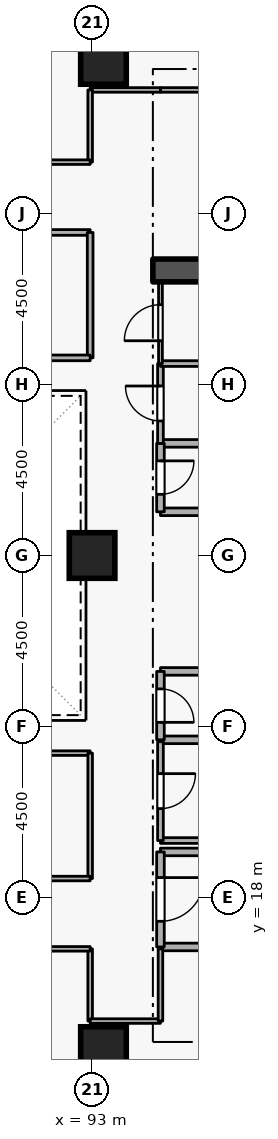
"""IFC4 building model, lengths in metres.
Left out: names, types, materials, properties, quantities, classifications, styles, units other than length and angle.
Written with IfcOpenShell. Run it as: python <this file> out.ifc"""

import sys

from ifc_helpers import new_model, si_unit, direction, frame, frame_2d, origin, origin_2d, place, context, subcontext, project, spatial, rectangle, extrude, element, fill, save


model = new_model("IFC4")
c1 = context("Model", 3, precision=1e-05, world=origin(), true_north=direction((0.0, 1.0)))
c2 = subcontext(c1, "Body", "Model", "MODEL_VIEW")
j1 = project(units=[si_unit("LENGTHUNIT", "METRE"), si_unit("PLANEANGLEUNIT", "RADIAN")], contexts=[c1])
p1 = place(None, origin())
s1 = spatial("IfcSite", under=j1, at=p1, CompositionType="ELEMENT")
p2 = place(p1, origin())
s2 = spatial("IfcBuilding", under=s1, at=p2, CompositionType="ELEMENT")
p3 = place(p2, frame((0.0, 0.0, 94.5)))
s3 = spatial("IfcBuildingStorey", under=s2, at=p3, CompositionType="ELEMENT", Elevation=94.5)
p4 = place(p3, frame((94.6, 34.5, 0.0), z_axis=(0.0, 0.0, 1.0), x_axis=(1.0, 0.0, 0.0)))
e1 = element("IfcWall", 1, at=p4, inside=s3, PredefinedType="SHEAR", context=c2, shape_type="SweptSolid", body=[
    extrude(rectangle(XDim=5.7, YDim=0.6, at=frame_2d((2.85, 0.0))), origin(), (0.0, 0.0, 1.0), 3.6),
])
for number, where, z_axis, x_axis in (
    (2, (93.3, 14.0, 0.0), (0.0, 0.0, 1.0), (1.0, 0.0, 0.0)),
    (3, (93.3, 40.0, 0.0), (0.0, 0.0, 1.0), (1.0, 0.0, 0.0)),
    (4, (93.0, 27.0, 0.0), (0.0, 0.0, 1.0), (1.0, 0.0, 0.0)),
):
    element("IfcColumn", number, at=place(p3, frame(where, z_axis=z_axis, x_axis=x_axis)), inside=s3, PredefinedType="COLUMN", context=c2, shape_type="SweptSolid", body=[
        extrude(rectangle(XDim=1.2, YDim=1.2, at=origin_2d()), origin(), (0.0, 0.0, 1.0), 3.6),
    ])
p5 = place(p3, frame((94.8, 16.7, 0.0), z_axis=(0.0, 0.0, 1.0), x_axis=(1.0, 0.0, 0.0)))
e5 = element("IfcWall", 5, at=p5, inside=s3, PredefinedType="STANDARD", context=c2, shape_type="SweptSolid", body=[
    extrude(rectangle(XDim=5.7, YDim=0.2, at=frame_2d((2.85, 0.0))), origin(), (0.0, 0.0, 1.0), 3.3),
])
p6 = place(p3, frame((97.1, 19.2, 0.0), z_axis=(0.0, 0.0, 1.0), x_axis=(-1.0, 0.0, 0.0)))
e6 = element("IfcWall", 6, at=p6, inside=s3, PredefinedType="STANDARD", context=c2, shape_type="SweptSolid", body=[
    extrude(rectangle(XDim=2.3, YDim=0.2, at=frame_2d((1.15, 0.0))), origin(), (0.0, 0.0, 1.0), 2.505),
])
p7 = place(p3, frame((94.8, 19.2, 0.0), z_axis=(0.0, 0.0, 1.0), x_axis=(0.0, -1.0, 0.0)))
e7 = element("IfcWall", 7, at=p7, inside=s3, PredefinedType="STANDARD", context=c2, shape_type="SweptSolid", body=[
    extrude(rectangle(XDim=2.5, YDim=0.2, at=frame_2d((1.25, 0.0))), origin(), (0.0, 0.0, 1.0), 3.3),
])
p8 = place(p7, frame((0.675, 0.0, 0.0)))
e8 = element("IfcOpeningElement", 8, at=p8, cuts=e7, PredefinedType="OPENING", context=c2, shape_type="SweptSolid", body=[
    extrude(rectangle(XDim=1.15, YDim=2.1, at=frame_2d((0.575, 1.05))), frame((0.0, 0.11, 0.0), z_axis=(0.0, -1.0, 0.0), x_axis=(1.0, 0.0, 0.0)), (0.0, 0.0, 1.0), 0.22),
])
for number, where, z_axis, x_axis in (
    (9, (94.8, 28.15, 0.0), (0.0, 0.0, 1.0), (1.0, 0.0, 0.0)),
    (10, (96.85, 29.95, 0.0), (0.0, 0.0, 1.0), (-1.0, 0.0, 0.0)),
):
    element("IfcWall", number, at=place(p3, frame(where, z_axis=z_axis, x_axis=x_axis)), inside=s3, PredefinedType="STANDARD", context=c2, shape_type="SweptSolid", body=[
        extrude(rectangle(XDim=2.05, YDim=0.2, at=frame_2d((1.025, 0.0))), origin(), (0.0, 0.0, 1.0), 3.3),
    ])
p9 = place(p3, frame((94.8, 29.95, 0.0), z_axis=(0.0, 0.0, 1.0), x_axis=(0.0, -1.0, 0.0)))
e11 = element("IfcWall", 11, at=p9, inside=s3, PredefinedType="STANDARD", context=c2, shape_type="SweptSolid", body=[
    extrude(rectangle(XDim=1.8, YDim=0.2, at=frame_2d((0.9, 0.0))), origin(), (0.0, 0.0, 1.0), 3.3),
])
p10 = place(p9, frame((0.46, 0.0, 0.0)))
e12 = element("IfcOpeningElement", 12, at=p10, cuts=e11, PredefinedType="OPENING", context=c2, shape_type="SweptSolid", body=[
    extrude(rectangle(XDim=0.88, YDim=2.04, at=frame_2d((0.44, 1.02))), frame((0.0, 0.11, 0.0), z_axis=(0.0, -1.0, 0.0), x_axis=(1.0, 0.0, 0.0)), (0.0, 0.0, 1.0), 0.22),
])
for number, where, z_axis, x_axis in (
    (13, (94.8, 22.15, 0.0), (0.0, 0.0, 1.0), (1.0, 0.0, 0.0)),
    (14, (96.85, 23.95, 0.0), (0.0, 0.0, 1.0), (-1.0, 0.0, 0.0)),
):
    element("IfcWall", number, at=place(p3, frame(where, z_axis=z_axis, x_axis=x_axis)), inside=s3, PredefinedType="STANDARD", context=c2, shape_type="SweptSolid", body=[
        extrude(rectangle(XDim=2.05, YDim=0.2, at=frame_2d((1.025, 0.0))), origin(), (0.0, 0.0, 1.0), 3.3),
    ])
p11 = place(p3, frame((94.8, 23.95, 0.0), z_axis=(0.0, 0.0, 1.0), x_axis=(0.0, -1.0, 0.0)))
e15 = element("IfcWall", 15, at=p11, inside=s3, PredefinedType="STANDARD", context=c2, shape_type="SweptSolid", body=[
    extrude(rectangle(XDim=1.8, YDim=0.2, at=frame_2d((0.9, 0.0))), origin(), (0.0, 0.0, 1.0), 3.3),
])
p12 = place(p11, frame((0.46, 0.0, 0.0)))
e16 = element("IfcOpeningElement", 16, at=p12, cuts=e15, PredefinedType="OPENING", context=c2, shape_type="SweptSolid", body=[
    extrude(rectangle(XDim=0.88, YDim=2.04, at=frame_2d((0.44, 1.02))), frame((0.0, 0.11, 0.0), z_axis=(0.0, -1.0, 0.0), x_axis=(1.0, 0.0, 0.0)), (0.0, 0.0, 1.0), 0.22),
])
p13 = place(p3, frame((94.8, 19.5, 0.0), z_axis=(0.0, 0.0, 1.0), x_axis=(1.0, 0.0, 0.0)))
e17 = element("IfcWall", 17, at=p13, inside=s3, PredefinedType="PARTITIONING", context=c2, shape_type="SweptSolid", body=[
    extrude(rectangle(XDim=2.05, YDim=0.15, at=frame_2d((1.025, 0.0))), origin(), (0.0, 0.0, 1.0), 2.505),
])
p14 = place(p3, frame((94.8, 22.1, 0.0), z_axis=(0.0, 0.0, 1.0), x_axis=(0.0, -1.0, 0.0)))
e18 = element("IfcWall", 18, at=p14, inside=s3, PredefinedType="PARTITIONING", context=c2, shape_type="SweptSolid", body=[
    extrude(rectangle(XDim=2.6, YDim=0.15, at=frame_2d((1.3, 0.0))), origin(), (0.0, 0.0, 1.0), 3.3),
])
p15 = place(p14, frame((0.84, 0.0, 0.0)))
e19 = element("IfcOpeningElement", 19, at=p15, cuts=e18, PredefinedType="OPENING", context=c2, shape_type="SweptSolid", body=[
    extrude(rectangle(XDim=0.92, YDim=2.08, at=frame_2d((0.46, 1.04))), frame((0.0, 0.085, 0.0), z_axis=(0.0, -1.0, 0.0), x_axis=(1.0, 0.0, 0.0)), (0.0, 0.0, 1.0), 0.17),
])
p16 = place(p3, frame((94.8, 29.95, 0.0), z_axis=(0.0, 0.0, 1.0), x_axis=(0.0, 1.0, 0.0)))
e20 = element("IfcWall", 20, at=p16, inside=s3, PredefinedType="PARTITIONING", context=c2, shape_type="SweptSolid", body=[
    extrude(rectangle(XDim=2.1, YDim=0.15, at=frame_2d((1.05, 0.0))), origin(), (0.0, 0.0, 1.0), 3.3),
])
p17 = place(p16, frame((0.59, 0.0, 0.0)))
e21 = element("IfcOpeningElement", 21, at=p17, cuts=e20, PredefinedType="OPENING", context=c2, shape_type="SweptSolid", body=[
    extrude(rectangle(XDim=0.92, YDim=2.08, at=frame_2d((0.46, 1.04))), frame((0.0, 0.085, 0.0), z_axis=(0.0, -1.0, 0.0), x_axis=(1.0, 0.0, 0.0)), (0.0, 0.0, 1.0), 0.17),
])
p18 = place(p3, frame((94.8, 32.05, 0.0), z_axis=(0.0, 0.0, 1.0), x_axis=(1.0, 0.0, 0.0)))
e22 = element("IfcWall", 22, at=p18, inside=s3, PredefinedType="PARTITIONING", context=c2, shape_type="SweptSolid", body=[
    extrude(rectangle(XDim=2.05, YDim=0.15, at=frame_2d((1.025, 0.0))), origin(), (0.0, 0.0, 1.0), 3.3),
])
p19 = place(p3, frame((94.8, 32.05, 0.0), z_axis=(0.0, 0.0, 1.0), x_axis=(0.0, 1.0, 0.0)))
e23 = element("IfcWall", 23, at=p19, inside=s3, PredefinedType="PARTITIONING", context=c2, shape_type="SweptSolid", body=[
    extrude(rectangle(XDim=2.15, YDim=0.1, at=frame_2d((1.075, 0.0))), origin(), (0.0, 0.0, 1.0), 3.3),
])
p20 = place(p19, frame((0.6, 0.0, 0.0)))
e24 = element("IfcOpeningElement", 24, at=p20, cuts=e23, PredefinedType="OPENING", context=c2, shape_type="SweptSolid", body=[
    extrude(rectangle(XDim=0.95, YDim=2.1, at=frame_2d((0.475, 1.05))), frame((0.0, 0.06, 0.0), z_axis=(0.0, -1.0, 0.0), x_axis=(1.0, 0.0, 0.0)), (0.0, 0.0, 1.0), 0.12),
])
p21 = place(p3, frame((92.95, 16.65, 0.0), z_axis=(0.0, 0.0, 1.0), x_axis=(0.0, -1.0, 0.0)))
e25 = element("IfcWall", 25, at=p21, inside=s3, PredefinedType="PARTITIONING", context=c2, shape_type="SweptSolid", body=[
    extrude(rectangle(XDim=1.9, YDim=0.12, at=frame_2d((0.95, 0.0))), origin(), (0.0, 0.0, 1.0), 3.3),
])
p22 = place(p3, frame((92.95, 14.75, 0.0), z_axis=(0.0, 0.0, 1.0), x_axis=(1.0, 0.0, 0.0)))
e26 = element("IfcWall", 26, at=p22, inside=s3, PredefinedType="PARTITIONING", context=c2, shape_type="SweptSolid", body=[
    extrude(rectangle(XDim=1.85, YDim=0.12, at=frame_2d((0.925, 0.0))), origin(), (0.0, 0.0, 1.0), 3.3),
])
p23 = place(p3, frame((94.8, 14.75, 0.0), z_axis=(0.0, 0.0, 1.0), x_axis=(0.0, 1.0, 0.0)))
e27 = element("IfcWall", 27, at=p23, inside=s3, PredefinedType="PARTITIONING", context=c2, shape_type="SweptSolid", body=[
    extrude(rectangle(XDim=1.9, YDim=0.12, at=frame_2d((0.95, 0.0))), origin(), (0.0, 0.0, 1.0), 3.3),
])
p24 = place(p3, frame((88.5, 16.65, 0.0), z_axis=(0.0, 0.0, 1.0), x_axis=(1.0, 0.0, 0.0)))
e28 = element("IfcWall", 28, at=p24, inside=s3, PredefinedType="PARTITIONING", context=c2, shape_type="SweptSolid", body=[
    extrude(rectangle(XDim=4.45, YDim=0.12, at=frame_2d((2.225, 0.0))), origin(), (0.0, 0.0, 1.0), 3.3),
])
p25 = place(p24, frame((1.7, 0.0, 0.0)))
e29 = element("IfcOpeningElement", 29, at=p25, cuts=e28, PredefinedType="OPENING", context=c2, shape_type="SweptSolid", body=[
    extrude(rectangle(XDim=1.05, YDim=2.1, at=frame_2d((0.525, 1.05))), frame((0.0, 0.07, 0.0), z_axis=(0.0, -1.0, 0.0), x_axis=(1.0, 0.0, 0.0)), (0.0, 0.0, 1.0), 0.14),
])
p26 = place(p3, frame((97.95, 39.25, 0.0), z_axis=(0.0, 0.0, 1.0), x_axis=(-1.0, 0.0, 0.0)))
e30 = element("IfcWall", 30, at=p26, inside=s3, PredefinedType="PARTITIONING", context=c2, shape_type="SweptSolid", body=[
    extrude(rectangle(XDim=3.15, YDim=0.12, at=frame_2d((1.575, 0.0))), origin(), (0.0, 0.0, 1.0), 3.3),
])
p27 = place(p3, frame((94.8, 39.25, 0.0), z_axis=(0.0, 0.0, 1.0), x_axis=(-1.0, 0.0, 0.0)))
e31 = element("IfcWall", 31, at=p27, inside=s3, PredefinedType="PARTITIONING", context=c2, shape_type="SweptSolid", body=[
    extrude(rectangle(XDim=1.85, YDim=0.12, at=frame_2d((0.925, 0.0))), origin(), (0.0, 0.0, 1.0), 3.3),
])
p28 = place(p3, frame((92.95, 39.25, 0.0), z_axis=(0.0, 0.0, 1.0), x_axis=(0.0, -1.0, 0.0)))
e32 = element("IfcWall", 32, at=p28, inside=s3, PredefinedType="PARTITIONING", context=c2, shape_type="SweptSolid", body=[
    extrude(rectangle(XDim=1.9, YDim=0.12, at=frame_2d((0.95, 0.0))), origin(), (0.0, 0.0, 1.0), 3.3),
])
p29 = place(p3, frame((92.95, 37.35, 0.0), z_axis=(0.0, 0.0, 1.0), x_axis=(-1.0, 0.0, 0.0)))
e33 = element("IfcWall", 33, at=p29, inside=s3, PredefinedType="PARTITIONING", context=c2, shape_type="SweptSolid", body=[
    extrude(rectangle(XDim=4.45, YDim=0.12, at=frame_2d((2.225, 0.0))), origin(), (0.0, 0.0, 1.0), 3.3),
])
p30 = place(p29, frame((1.7, 0.0, 0.0)))
e34 = element("IfcOpeningElement", 34, at=p30, cuts=e33, PredefinedType="OPENING", context=c2, shape_type="SweptSolid", body=[
    extrude(rectangle(XDim=1.05, YDim=2.1, at=frame_2d((0.525, 1.05))), frame((0.0, 0.07, 0.0), z_axis=(0.0, -1.0, 0.0), x_axis=(1.0, 0.0, 0.0)), (0.0, 0.0, 1.0), 0.14),
])
p31 = place(p3, frame((84.05, 35.5, 0.0), z_axis=(0.0, 0.0, 1.0), x_axis=(1.0, 0.0, 0.0)))
e35 = element("IfcWall", 35, at=p31, inside=s3, PredefinedType="PARTITIONING", context=c2, shape_type="SweptSolid", body=[
    extrude(rectangle(XDim=8.9, YDim=0.15, at=frame_2d((4.45, 0.0))), origin(), (0.0, 0.0, 1.0), 3.3),
])
p32 = place(p31, frame((3.8, 0.0, 0.0)))
e36 = element("IfcOpeningElement", 36, at=p32, cuts=e35, PredefinedType="OPENING", context=c2, shape_type="SweptSolid", body=[
    extrude(rectangle(XDim=1.3, YDim=2.12, at=frame_2d((0.65, 1.06))), frame((0.0, 0.085, 0.0), z_axis=(0.0, -1.0, 0.0), x_axis=(1.0, 0.0, 0.0)), (0.0, 0.0, 1.0), 0.17),
])
p33 = place(p3, frame((92.95, 35.5, 0.0), z_axis=(0.0, 0.0, 1.0), x_axis=(0.0, -1.0, 0.0)))
e37 = element("IfcWall", 37, at=p33, inside=s3, PredefinedType="PARTITIONING", context=c2, shape_type="SweptSolid", body=[
    extrude(rectangle(XDim=3.3, YDim=0.15, at=frame_2d((1.65, 0.0))), origin(), (0.0, 0.0, 1.0), 3.3),
])
p34 = place(p3, frame((92.95, 32.2, 0.0), z_axis=(0.0, 0.0, 1.0), x_axis=(-1.0, 0.0, 0.0)))
e38 = element("IfcWall", 38, at=p34, inside=s3, PredefinedType="PARTITIONING", context=c2, shape_type="SweptSolid", body=[
    extrude(rectangle(XDim=8.9, YDim=0.15, at=frame_2d((4.45, 0.0))), origin(), (0.0, 0.0, 1.0), 3.3),
])
p35 = place(p3, frame((84.05, 21.8, 0.0), z_axis=(0.0, 0.0, 1.0), x_axis=(1.0, 0.0, 0.0)))
e39 = element("IfcWall", 39, at=p35, inside=s3, PredefinedType="PARTITIONING", context=c2, shape_type="SweptSolid", body=[
    extrude(rectangle(XDim=8.9, YDim=0.12, at=frame_2d((4.45, 0.0))), origin(), (0.0, 0.0, 1.0), 3.3),
])
p36 = place(p3, frame((92.95, 21.8, 0.0), z_axis=(0.0, 0.0, 1.0), x_axis=(0.0, -1.0, 0.0)))
e40 = element("IfcWall", 40, at=p36, inside=s3, PredefinedType="PARTITIONING", context=c2, shape_type="SweptSolid", body=[
    extrude(rectangle(XDim=3.3, YDim=0.12, at=frame_2d((1.65, 0.0))), origin(), (0.0, 0.0, 1.0), 3.3),
])
p37 = place(p3, frame((92.95, 18.5, 0.0), z_axis=(0.0, 0.0, 1.0), x_axis=(-1.0, 0.0, 0.0)))
e41 = element("IfcWall", 41, at=p37, inside=s3, PredefinedType="PARTITIONING", context=c2, shape_type="SweptSolid", body=[
    extrude(rectangle(XDim=8.9, YDim=0.12, at=frame_2d((4.45, 0.0))), origin(), (0.0, 0.0, 1.0), 3.3),
])
p38 = place(p37, frame((2.875, 0.0, 0.0)))
e42 = element("IfcOpeningElement", 42, at=p38, cuts=e41, PredefinedType="OPENING", context=c2, shape_type="SweptSolid", body=[
    extrude(rectangle(XDim=0.95, YDim=2.1, at=frame_2d((0.475, 1.05))), frame((0.0, 0.07, 0.0), z_axis=(0.0, -1.0, 0.0), x_axis=(1.0, 0.0, 0.0)), (0.0, 0.0, 1.0), 0.14),
])
p39 = place(p8, origin())
e43 = element("IfcDoor", 43, at=p39, inside=s3, OperationType="SINGLE_SWING_LEFT", PredefinedType="DOOR", context=c2, shape_type="SweptSolid", body=[
    extrude(rectangle(XDim=1.15, YDim=2.1, at=frame_2d((0.575, 1.05))), frame((0.0, 0.025, 0.0), z_axis=(0.0, -1.0, 0.0), x_axis=(1.0, 0.0, 0.0)), (0.0, 0.0, 1.0), 0.05),
])
fill(e8, e43)
p40 = place(p10, origin())
e44 = element("IfcDoor", 44, at=p40, inside=s3, OperationType="SINGLE_SWING_LEFT", PredefinedType="DOOR", context=c2, shape_type="SweptSolid", body=[
    extrude(rectangle(XDim=0.88, YDim=2.04, at=frame_2d((0.44, 1.02))), frame((0.0, 0.025, 0.0), z_axis=(0.0, -1.0, 0.0), x_axis=(1.0, 0.0, 0.0)), (0.0, 0.0, 1.0), 0.05),
])
fill(e12, e44)
p41 = place(p12, origin())
e45 = element("IfcDoor", 45, at=p41, inside=s3, OperationType="SINGLE_SWING_RIGHT", PredefinedType="DOOR", context=c2, shape_type="SweptSolid", body=[
    extrude(rectangle(XDim=0.88, YDim=2.04, at=frame_2d((0.44, 1.02))), frame((0.0, 0.025, 0.0), z_axis=(0.0, -1.0, 0.0), x_axis=(1.0, 0.0, 0.0)), (0.0, 0.0, 1.0), 0.05),
])
fill(e16, e45)
p42 = place(p15, origin())
e46 = element("IfcDoor", 46, at=p42, inside=s3, OperationType="SINGLE_SWING_LEFT", PredefinedType="DOOR", context=c2, shape_type="SweptSolid", body=[
    extrude(rectangle(XDim=0.92, YDim=2.08, at=frame_2d((0.46, 1.04))), frame((0.0, 0.025, 0.0), z_axis=(0.0, -1.0, 0.0), x_axis=(1.0, 0.0, 0.0)), (0.0, 0.0, 1.0), 0.05),
])
fill(e19, e46)
p43 = place(p17, origin())
e47 = element("IfcDoor", 47, at=p43, inside=s3, OperationType="SINGLE_SWING_RIGHT", PredefinedType="DOOR", context=c2, shape_type="SweptSolid", body=[
    extrude(rectangle(XDim=0.92, YDim=2.08, at=frame_2d((0.46, 1.04))), frame((0.0, 0.025, 0.0), z_axis=(0.0, -1.0, 0.0), x_axis=(1.0, 0.0, 0.0)), (0.0, 0.0, 1.0), 0.05),
])
fill(e21, e47)
p44 = place(p20, origin())
e48 = element("IfcDoor", 48, at=p44, inside=s3, OperationType="SINGLE_SWING_LEFT", PredefinedType="DOOR", context=c2, shape_type="SweptSolid", body=[
    extrude(rectangle(XDim=0.95, YDim=2.1, at=frame_2d((0.475, 1.05))), frame((0.0, 0.025, 0.0), z_axis=(0.0, -1.0, 0.0), x_axis=(1.0, 0.0, 0.0)), (0.0, 0.0, 1.0), 0.05),
])
fill(e24, e48)
save(model, sys.argv[1])
